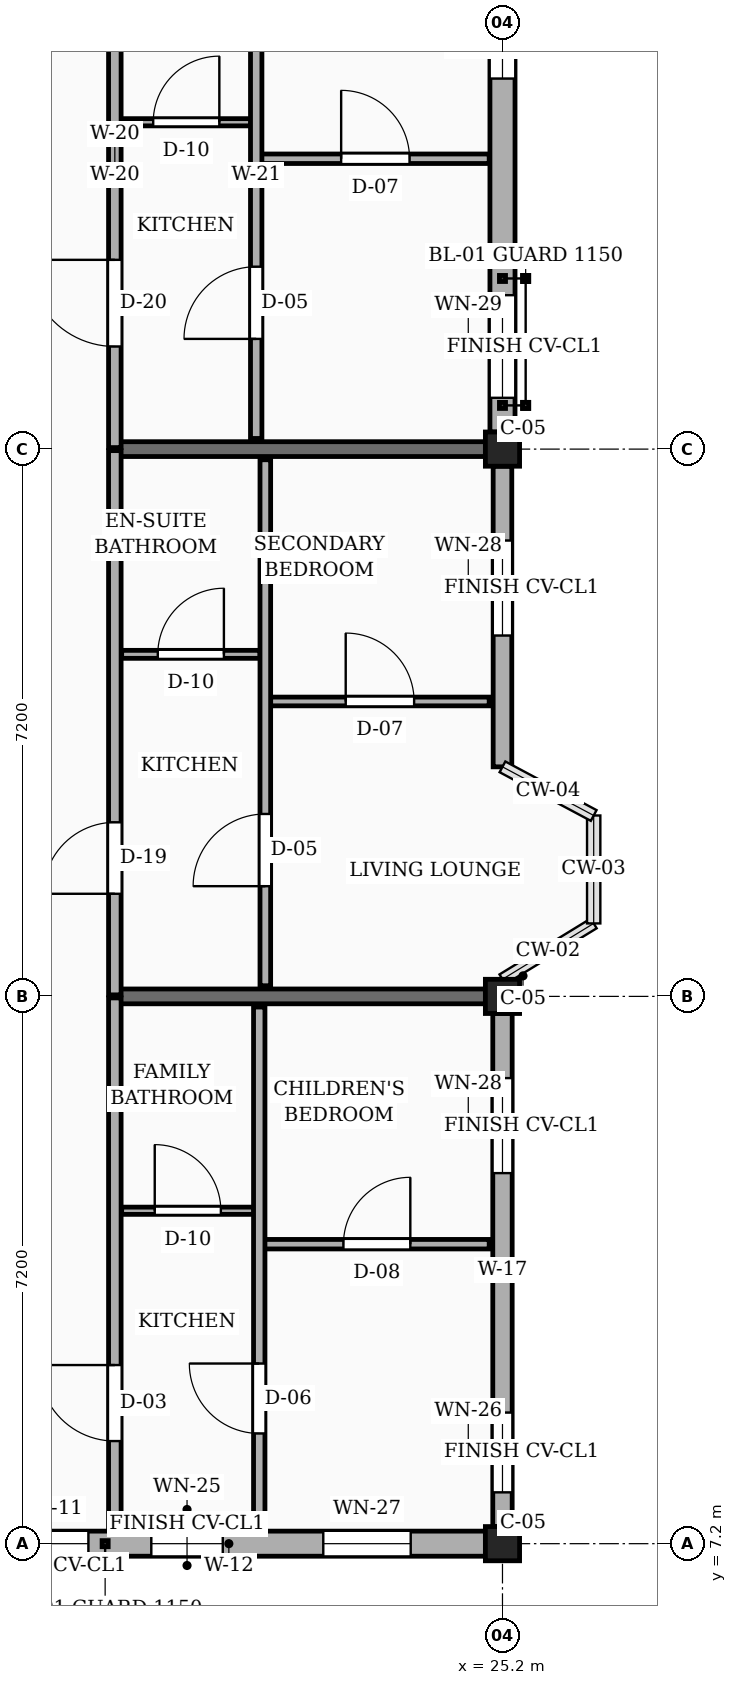
"""IFC4 building model, lengths in metres.
Left out: names, types, materials, properties, quantities, classifications, styles, units other than length and angle.
Written with IfcOpenShell. Run it as: python <this file> out.ifc"""

import sys

from ifc_helpers import new_model, si_unit, direction, frame, frame_2d, origin, origin_2d, place, context, subcontext, project, spatial, rectangle, extrude, element, fill, save


model = new_model("IFC4")
c1 = context("Model", 3, precision=1e-05, world=origin(), true_north=direction((0.0, 1.0)))
c2 = subcontext(c1, "Body", "Model", "MODEL_VIEW")
j1 = project(units=[si_unit("LENGTHUNIT", "METRE"), si_unit("PLANEANGLEUNIT", "RADIAN")], contexts=[c1])
p1 = place(None, origin())
s1 = spatial("IfcSite", under=j1, at=p1, CompositionType="ELEMENT")
p2 = place(p1, origin())
s2 = spatial("IfcBuilding", under=s1, at=p2, CompositionType="ELEMENT")
p3 = place(p2, frame((0.0, 0.0, 39.15)))
s3 = spatial("IfcBuildingStorey", under=s2, at=p3, CompositionType="ELEMENT", Elevation=39.15)
for number, where, z_axis, x_axis in (
    (1, (25.2, 7.2, 0.0), (0.0, 0.0, 1.0), (1.0, 0.0, 0.0)),
    (2, (25.2, 14.4, 0.0), (0.0, 0.0, 1.0), (1.0, 0.0, 0.0)),
    (3, (25.2, 21.6, 0.0), (0.0, 0.0, 1.0), (1.0, 0.0, 0.0)),
):
    element("IfcColumn", number, at=place(p3, frame(where, z_axis=z_axis, x_axis=x_axis)), inside=s3, PredefinedType="COLUMN", context=c2, shape_type="SweptSolid", body=[
        extrude(rectangle(XDim=0.45, YDim=0.45, at=origin_2d()), origin(), (0.0, 0.0, 1.0), 3.15),
    ])
for number, where, z_axis, x_axis in (
    (4, (20.1, 14.4, 0.0), (0.0, 0.0, 1.0), (1.0, 0.0, 0.0)),
    (5, (20.1, 21.6, 0.0), (0.0, 0.0, 1.0), (1.0, 0.0, 0.0)),
):
    element("IfcWall", number, at=place(p3, frame(where, z_axis=z_axis, x_axis=x_axis)), inside=s3, PredefinedType="SOLIDWALL", context=c2, shape_type="SweptSolid", body=[
        extrude(rectangle(XDim=4.875, YDim=0.195, at=frame_2d((2.438, 0.0))), origin(), (0.0, 0.0, 1.0), 2.17),
    ])
p4 = place(p3, frame((18.225, 7.2, 0.0), z_axis=(0.0, 0.0, 1.0), x_axis=(1.0, 0.0, 0.0)))
e6 = element("IfcWall", 6, at=p4, inside=s3, PredefinedType="SOLIDWALL", context=c2, shape_type="SweptSolid", body=[
    extrude(rectangle(XDim=6.75, YDim=0.33, at=frame_2d((3.375, 0.0))), origin(), (0.0, 0.0, 1.0), 2.44),
])
p5 = place(p4, frame((0.488, 0.0, 0.78)))
e7 = element("IfcOpeningElement", 7, at=p5, cuts=e6, PredefinedType="OPENING", context=c2, shape_type="SweptSolid", body=[
    extrude(rectangle(XDim=1.04, YDim=1.26, at=frame_2d((0.52, 0.63))), frame((0.0, 0.175, 0.0), z_axis=(0.0, -1.0, 0.0), x_axis=(1.0, 0.0, 0.0)), (0.0, 0.0, 1.0), 0.35),
])
p6 = place(p4, frame((2.355, 0.0, 0.78)))
e8 = element("IfcOpeningElement", 8, at=p6, cuts=e6, PredefinedType="OPENING", context=c2, shape_type="SweptSolid", body=[
    extrude(rectangle(XDim=0.94, YDim=1.44, at=frame_2d((0.47, 0.72))), frame((0.0, 0.175, 0.0), z_axis=(0.0, -1.0, 0.0), x_axis=(1.0, 0.0, 0.0)), (0.0, 0.0, 1.0), 0.35),
])
p7 = place(p4, frame((4.617, 0.0, 0.78)))
e9 = element("IfcOpeningElement", 9, at=p7, cuts=e6, PredefinedType="OPENING", context=c2, shape_type="SweptSolid", body=[
    extrude(rectangle(XDim=1.15, YDim=1.44, at=frame_2d((0.575, 0.72))), frame((0.0, 0.175, 0.0), z_axis=(0.0, -1.0, 0.0), x_axis=(1.0, 0.0, 0.0)), (0.0, 0.0, 1.0), 0.35),
])
p8 = place(p3, frame((25.2, 7.425, 0.0), z_axis=(0.0, 0.0, 1.0), x_axis=(0.0, 1.0, 0.0)))
e10 = element("IfcWall", 10, at=p8, inside=s3, PredefinedType="SOLIDWALL", context=c2, shape_type="SweptSolid", body=[
    extrude(rectangle(XDim=6.75, YDim=0.255, at=frame_2d((3.375, 0.0))), origin(), (0.0, 0.0, 1.0), 2.44),
])
p9 = place(p8, frame((0.45, 0.0, 0.78)))
e11 = element("IfcOpeningElement", 11, at=p9, cuts=e10, PredefinedType="OPENING", context=c2, shape_type="SweptSolid", body=[
    extrude(rectangle(XDim=1.05, YDim=1.44, at=frame_2d((0.525, 0.72))), frame((0.0, 0.137, 0.0), z_axis=(0.0, -1.0, 0.0), x_axis=(1.0, 0.0, 0.0)), (0.0, 0.0, 1.0), 0.275),
])
p10 = place(p8, frame((4.65, 0.0, 0.78)))
e12 = element("IfcOpeningElement", 12, at=p10, cuts=e10, PredefinedType="OPENING", context=c2, shape_type="SweptSolid", body=[
    extrude(rectangle(XDim=1.25, YDim=1.44, at=frame_2d((0.625, 0.72))), frame((0.0, 0.137, 0.0), z_axis=(0.0, -1.0, 0.0), x_axis=(1.0, 0.0, 0.0)), (0.0, 0.0, 1.0), 0.275),
])
p11 = place(p3, frame((25.2, 17.42, 0.0), z_axis=(0.0, 0.0, 1.0), x_axis=(0.0, 1.0, 0.0)))
e13 = element("IfcWall", 13, at=p11, inside=s3, PredefinedType="SOLIDWALL", context=c2, shape_type="SweptSolid", body=[
    extrude(rectangle(XDim=3.955, YDim=0.245, at=frame_2d((1.978, 0.0))), origin(), (0.0, 0.0, 1.0), 2.44),
])
p12 = place(p11, frame((1.728, 0.0, 0.78)))
e14 = element("IfcOpeningElement", 14, at=p12, cuts=e13, PredefinedType="OPENING", context=c2, shape_type="SweptSolid", body=[
    extrude(rectangle(XDim=1.25, YDim=1.44, at=frame_2d((0.625, 0.72))), frame((0.0, 0.133, 0.0), z_axis=(0.0, -1.0, 0.0), x_axis=(1.0, 0.0, 0.0)), (0.0, 0.0, 1.0), 0.265),
])
p13 = place(p3, frame((25.2, 21.825, 0.0), z_axis=(0.0, 0.0, 1.0), x_axis=(0.0, 1.0, 0.0)))
e15 = element("IfcWall", 15, at=p13, inside=s3, PredefinedType="SOLIDWALL", context=c2, shape_type="SweptSolid", body=[
    extrude(rectangle(XDim=6.75, YDim=0.33, at=frame_2d((3.375, 0.0))), origin(), (0.0, 0.0, 1.0), 2.44),
])
p14 = place(p13, frame((0.45, 0.0, 0.78)))
e16 = element("IfcOpeningElement", 16, at=p14, cuts=e15, PredefinedType="OPENING", context=c2, shape_type="SweptSolid", body=[
    extrude(rectangle(XDim=1.35, YDim=1.44, at=frame_2d((0.675, 0.72))), frame((0.0, 0.175, 0.0), z_axis=(0.0, -1.0, 0.0), x_axis=(1.0, 0.0, 0.0)), (0.0, 0.0, 1.0), 0.35),
])
p15 = place(p13, frame((4.65, 0.0, 0.78)))
e17 = element("IfcOpeningElement", 17, at=p15, cuts=e15, PredefinedType="OPENING", context=c2, shape_type="SweptSolid", body=[
    extrude(rectangle(XDim=0.85, YDim=1.15, at=frame_2d((0.425, 0.575))), frame((0.0, 0.175, 0.0), z_axis=(0.0, -1.0, 0.0), x_axis=(1.0, 0.0, 0.0)), (0.0, 0.0, 1.0), 0.35),
])
p16 = place(p3, frame((20.1, 7.375, 0.0), z_axis=(0.0, 0.0, 1.0), x_axis=(0.0, 1.0, 0.0)))
e18 = element("IfcWall", 18, at=p16, inside=s3, PredefinedType="PARTITIONING", context=c2, shape_type="SweptSolid", body=[
    extrude(rectangle(XDim=7.005, YDim=0.165, at=frame_2d((3.502, 0.0))), origin(), (0.0, 0.0, 1.0), 2.305),
])
p17 = place(p16, frame((1.175, 0.0, 0.0)))
e19 = element("IfcOpeningElement", 19, at=p17, cuts=e18, PredefinedType="OPENING", context=c2, shape_type="SweptSolid", body=[
    extrude(rectangle(XDim=1.0, YDim=2.15, at=frame_2d((0.5, 1.075))), frame((0.0, 0.093, 0.0), z_axis=(0.0, -1.0, 0.0), x_axis=(1.0, 0.0, 0.0)), (0.0, 0.0, 1.0), 0.185),
])
p18 = place(p3, frame((20.1, 14.42, 0.0), z_axis=(0.0, 0.0, 1.0), x_axis=(0.0, 1.0, 0.0)))
e20 = element("IfcWall", 20, at=p18, inside=s3, PredefinedType="PARTITIONING", context=c2, shape_type="SweptSolid", body=[
    extrude(rectangle(XDim=7.16, YDim=0.165, at=frame_2d((3.58, 0.0))), origin(), (0.0, 0.0, 1.0), 2.305),
])
p19 = place(p18, frame((1.33, 0.0, 0.0)))
e21 = element("IfcOpeningElement", 21, at=p19, cuts=e20, PredefinedType="OPENING", context=c2, shape_type="SweptSolid", body=[
    extrude(rectangle(XDim=0.94, YDim=2.12, at=frame_2d((0.47, 1.06))), frame((0.0, 0.093, 0.0), z_axis=(0.0, -1.0, 0.0), x_axis=(1.0, 0.0, 0.0)), (0.0, 0.0, 1.0), 0.185),
])
p20 = place(p3, frame((20.1, 21.62, 0.0), z_axis=(0.0, 0.0, 1.0), x_axis=(0.0, 1.0, 0.0)))
e22 = element("IfcWall", 22, at=p20, inside=s3, PredefinedType="PARTITIONING", context=c2, shape_type="SweptSolid", body=[
    extrude(rectangle(XDim=7.16, YDim=0.165, at=frame_2d((3.58, 0.0))), origin(), (0.0, 0.0, 1.0), 2.305),
])
p21 = place(p20, frame((1.33, 0.0, 0.0)))
e23 = element("IfcOpeningElement", 23, at=p21, cuts=e22, PredefinedType="OPENING", context=c2, shape_type="SweptSolid", body=[
    extrude(rectangle(XDim=1.14, YDim=2.18, at=frame_2d((0.57, 1.09))), frame((0.0, 0.093, 0.0), z_axis=(0.0, -1.0, 0.0), x_axis=(1.0, 0.0, 0.0)), (0.0, 0.0, 1.0), 0.185),
])
p22 = place(p3, frame((22.07, 11.14, 0.0), z_axis=(0.0, 0.0, 1.0), x_axis=(1.0, 0.0, 0.0)))
e24 = element("IfcWall", 24, at=p22, inside=s3, PredefinedType="PARTITIONING", context=c2, shape_type="SweptSolid", body=[
    extrude(rectangle(XDim=2.955, YDim=0.125, at=frame_2d((1.478, 0.0))), origin(), (0.0, 0.0, 1.0), 2.305),
])
p23 = place(p22, frame((1.038, 0.0, 0.0)))
e25 = element("IfcOpeningElement", 25, at=p23, cuts=e24, PredefinedType="OPENING", context=c2, shape_type="SweptSolid", body=[
    extrude(rectangle(XDim=0.88, YDim=2.08, at=frame_2d((0.44, 1.04))), frame((0.0, 0.073, 0.0), z_axis=(0.0, -1.0, 0.0), x_axis=(1.0, 0.0, 0.0)), (0.0, 0.0, 1.0), 0.145),
])
p24 = place(p3, frame((20.19, 11.58, 0.0), z_axis=(0.0, 0.0, 1.0), x_axis=(1.0, 0.0, 0.0)))
e26 = element("IfcWall", 26, at=p24, inside=s3, PredefinedType="PARTITIONING", context=c2, shape_type="SweptSolid", body=[
    extrude(rectangle(XDim=1.74, YDim=0.095, at=frame_2d((0.87, 0.0))), origin(), (0.0, 0.0, 1.0), 2.305),
])
p25 = place(p24, frame((0.435, 0.0, 0.0)))
e27 = element("IfcOpeningElement", 27, at=p25, cuts=e26, PredefinedType="OPENING", context=c2, shape_type="SweptSolid", body=[
    extrude(rectangle(XDim=0.87, YDim=2.05, at=frame_2d((0.435, 1.025))), frame((0.0, 0.058, 0.0), z_axis=(0.0, -1.0, 0.0), x_axis=(1.0, 0.0, 0.0)), (0.0, 0.0, 1.0), 0.115),
])
p26 = place(p3, frame((22.0, 7.375, 0.0), z_axis=(0.0, 0.0, 1.0), x_axis=(0.0, 1.0, 0.0)))
e28 = element("IfcWall", 28, at=p26, inside=s3, PredefinedType="PARTITIONING", context=c2, shape_type="SweptSolid", body=[
    extrude(rectangle(XDim=6.885, YDim=0.15, at=frame_2d((3.442, 0.0))), origin(), (0.0, 0.0, 1.0), 2.305),
])
p27 = place(p26, frame((1.275, 0.0, 0.0)))
e29 = element("IfcOpeningElement", 29, at=p27, cuts=e28, PredefinedType="OPENING", context=c2, shape_type="SweptSolid", body=[
    extrude(rectangle(XDim=0.92, YDim=2.1, at=frame_2d((0.46, 1.05))), frame((0.0, 0.085, 0.0), z_axis=(0.0, -1.0, 0.0), x_axis=(1.0, 0.0, 0.0)), (0.0, 0.0, 1.0), 0.17),
])
p28 = place(p3, frame((22.15, 18.28, 0.0), z_axis=(0.0, 0.0, 1.0), x_axis=(1.0, 0.0, 0.0)))
e30 = element("IfcWall", 30, at=p28, inside=s3, PredefinedType="PARTITIONING", context=c2, shape_type="SweptSolid", body=[
    extrude(rectangle(XDim=2.875, YDim=0.115, at=frame_2d((1.438, 0.0))), origin(), (0.0, 0.0, 1.0), 2.305),
])
p29 = place(p28, frame((0.988, 0.0, 0.0)))
e31 = element("IfcOpeningElement", 31, at=p29, cuts=e30, PredefinedType="OPENING", context=c2, shape_type="SweptSolid", body=[
    extrude(rectangle(XDim=0.9, YDim=2.1, at=frame_2d((0.45, 1.05))), frame((0.0, 0.067, 0.0), z_axis=(0.0, -1.0, 0.0), x_axis=(1.0, 0.0, 0.0)), (0.0, 0.0, 1.0), 0.135),
])
p30 = place(p3, frame((20.19, 18.9, 0.0), z_axis=(0.0, 0.0, 1.0), x_axis=(1.0, 0.0, 0.0)))
e32 = element("IfcWall", 32, at=p30, inside=s3, PredefinedType="PARTITIONING", context=c2, shape_type="SweptSolid", body=[
    extrude(rectangle(XDim=1.82, YDim=0.105, at=frame_2d((0.91, 0.0))), origin(), (0.0, 0.0, 1.0), 2.305),
])
p31 = place(p30, frame((0.475, 0.0, 0.0)))
e33 = element("IfcOpeningElement", 33, at=p31, cuts=e32, PredefinedType="OPENING", context=c2, shape_type="SweptSolid", body=[
    extrude(rectangle(XDim=0.87, YDim=2.05, at=frame_2d((0.435, 1.025))), frame((0.0, 0.062, 0.0), z_axis=(0.0, -1.0, 0.0), x_axis=(1.0, 0.0, 0.0)), (0.0, 0.0, 1.0), 0.125),
])
p32 = place(p3, frame((22.08, 14.54, 0.0), z_axis=(0.0, 0.0, 1.0), x_axis=(0.0, 1.0, 0.0)))
e34 = element("IfcWall", 34, at=p32, inside=s3, PredefinedType="PARTITIONING", context=c2, shape_type="SweptSolid", body=[
    extrude(rectangle(XDim=6.92, YDim=0.14, at=frame_2d((3.46, 0.0))), origin(), (0.0, 0.0, 1.0), 2.305),
])
p33 = place(p32, frame((1.31, 0.0, 0.0)))
e35 = element("IfcOpeningElement", 35, at=p33, cuts=e34, PredefinedType="OPENING", context=c2, shape_type="SweptSolid", body=[
    extrude(rectangle(XDim=0.95, YDim=2.1, at=frame_2d((0.475, 1.05))), frame((0.0, 0.08, 0.0), z_axis=(0.0, -1.0, 0.0), x_axis=(1.0, 0.0, 0.0)), (0.0, 0.0, 1.0), 0.16),
])
p34 = place(p3, frame((22.03, 25.42, 0.0), z_axis=(0.0, 0.0, 1.0), x_axis=(1.0, 0.0, 0.0)))
e36 = element("IfcWall", 36, at=p34, inside=s3, PredefinedType="PARTITIONING", context=c2, shape_type="SweptSolid", body=[
    extrude(rectangle(XDim=2.995, YDim=0.125, at=frame_2d((1.498, 0.0))), origin(), (0.0, 0.0, 1.0), 2.305),
])
p35 = place(p34, frame((1.048, 0.0, 0.0)))
e37 = element("IfcOpeningElement", 37, at=p35, cuts=e36, PredefinedType="OPENING", context=c2, shape_type="SweptSolid", body=[
    extrude(rectangle(XDim=0.9, YDim=2.1, at=frame_2d((0.45, 1.05))), frame((0.0, 0.073, 0.0), z_axis=(0.0, -1.0, 0.0), x_axis=(1.0, 0.0, 0.0)), (0.0, 0.0, 1.0), 0.145),
])
p36 = place(p3, frame((20.19, 25.9, 0.0), z_axis=(0.0, 0.0, 1.0), x_axis=(1.0, 0.0, 0.0)))
e38 = element("IfcWall", 38, at=p36, inside=s3, PredefinedType="PARTITIONING", context=c2, shape_type="SweptSolid", body=[
    extrude(rectangle(XDim=1.7, YDim=0.095, at=frame_2d((0.85, 0.0))), origin(), (0.0, 0.0, 1.0), 2.305),
])
p37 = place(p36, frame((0.415, 0.0, 0.0)))
e39 = element("IfcOpeningElement", 39, at=p37, cuts=e38, PredefinedType="OPENING", context=c2, shape_type="SweptSolid", body=[
    extrude(rectangle(XDim=0.87, YDim=2.05, at=frame_2d((0.435, 1.025))), frame((0.0, 0.058, 0.0), z_axis=(0.0, -1.0, 0.0), x_axis=(1.0, 0.0, 0.0)), (0.0, 0.0, 1.0), 0.115),
])
p38 = place(p3, frame((21.96, 21.74, 0.0), z_axis=(0.0, 0.0, 1.0), x_axis=(0.0, 1.0, 0.0)))
e40 = element("IfcWall", 40, at=p38, inside=s3, PredefinedType="PARTITIONING", context=c2, shape_type="SweptSolid", body=[
    extrude(rectangle(XDim=6.92, YDim=0.15, at=frame_2d((3.46, 0.0))), origin(), (0.0, 0.0, 1.0), 2.305),
])
p39 = place(p38, frame((1.31, 0.0, 0.0)))
e41 = element("IfcOpeningElement", 41, at=p39, cuts=e40, PredefinedType="OPENING", context=c2, shape_type="SweptSolid", body=[
    extrude(rectangle(XDim=0.95, YDim=2.1, at=frame_2d((0.475, 1.05))), frame((0.0, 0.085, 0.0), z_axis=(0.0, -1.0, 0.0), x_axis=(1.0, 0.0, 0.0)), (0.0, 0.0, 1.0), 0.17),
])
p40 = place(p5, origin())
e42 = element("IfcWindow", 42, at=p40, inside=s3, PartitioningType="SINGLE_PANEL", PredefinedType="WINDOW", context=c2, shape_type="SweptSolid", body=[
    extrude(rectangle(XDim=1.04, YDim=1.26, at=frame_2d((0.52, 0.63))), frame((0.0, 0.03, 0.0), z_axis=(0.0, -1.0, 0.0), x_axis=(1.0, 0.0, 0.0)), (0.0, 0.0, 1.0), 0.06),
])
fill(e7, e42)
p41 = place(p6, origin())
e43 = element("IfcWindow", 43, at=p41, inside=s3, PartitioningType="SINGLE_PANEL", PredefinedType="WINDOW", context=c2, shape_type="SweptSolid", body=[
    extrude(rectangle(XDim=0.94, YDim=1.44, at=frame_2d((0.47, 0.72))), frame((0.0, 0.03, 0.0), z_axis=(0.0, -1.0, 0.0), x_axis=(1.0, 0.0, 0.0)), (0.0, 0.0, 1.0), 0.06),
])
fill(e8, e43)
p42 = place(p7, origin())
e44 = element("IfcWindow", 44, at=p42, inside=s3, PartitioningType="SINGLE_PANEL", PredefinedType="WINDOW", context=c2, shape_type="SweptSolid", body=[
    extrude(rectangle(XDim=1.15, YDim=1.44, at=frame_2d((0.575, 0.72))), frame((0.0, 0.03, 0.0), z_axis=(0.0, -1.0, 0.0), x_axis=(1.0, 0.0, 0.0)), (0.0, 0.0, 1.0), 0.06),
])
fill(e9, e44)
p43 = place(p9, origin())
e45 = element("IfcWindow", 45, at=p43, inside=s3, PartitioningType="SINGLE_PANEL", PredefinedType="WINDOW", context=c2, shape_type="SweptSolid", body=[
    extrude(rectangle(XDim=1.05, YDim=1.44, at=frame_2d((0.525, 0.72))), frame((0.0, 0.03, 0.0), z_axis=(0.0, -1.0, 0.0), x_axis=(1.0, 0.0, 0.0)), (0.0, 0.0, 1.0), 0.06),
])
fill(e11, e45)
p44 = place(p10, origin())
e46 = element("IfcWindow", 46, at=p44, inside=s3, PartitioningType="SINGLE_PANEL", PredefinedType="WINDOW", context=c2, shape_type="SweptSolid", body=[
    extrude(rectangle(XDim=1.25, YDim=1.44, at=frame_2d((0.625, 0.72))), frame((0.0, 0.03, 0.0), z_axis=(0.0, -1.0, 0.0), x_axis=(1.0, 0.0, 0.0)), (0.0, 0.0, 1.0), 0.06),
])
fill(e12, e46)
p45 = place(p12, origin())
e47 = element("IfcWindow", 47, at=p45, inside=s3, PartitioningType="SINGLE_PANEL", PredefinedType="WINDOW", context=c2, shape_type="SweptSolid", body=[
    extrude(rectangle(XDim=1.25, YDim=1.44, at=frame_2d((0.625, 0.72))), frame((0.0, 0.03, 0.0), z_axis=(0.0, -1.0, 0.0), x_axis=(1.0, 0.0, 0.0)), (0.0, 0.0, 1.0), 0.06),
])
fill(e14, e47)
p46 = place(p14, origin())
e48 = element("IfcWindow", 48, at=p46, inside=s3, PartitioningType="SINGLE_PANEL", PredefinedType="WINDOW", context=c2, shape_type="SweptSolid", body=[
    extrude(rectangle(XDim=1.35, YDim=1.44, at=frame_2d((0.675, 0.72))), frame((0.0, 0.03, 0.0), z_axis=(0.0, -1.0, 0.0), x_axis=(1.0, 0.0, 0.0)), (0.0, 0.0, 1.0), 0.06),
])
fill(e16, e48)
p47 = place(p15, origin())
e49 = element("IfcWindow", 49, at=p47, inside=s3, PartitioningType="SINGLE_PANEL", PredefinedType="WINDOW", context=c2, shape_type="SweptSolid", body=[
    extrude(rectangle(XDim=0.85, YDim=1.15, at=frame_2d((0.425, 0.575))), frame((0.0, 0.03, 0.0), z_axis=(0.0, -1.0, 0.0), x_axis=(1.0, 0.0, 0.0)), (0.0, 0.0, 1.0), 0.06),
])
fill(e17, e49)
p48 = place(p17, origin())
e50 = element("IfcDoor", 50, at=p48, inside=s3, OperationType="SINGLE_SWING_RIGHT", PredefinedType="DOOR", context=c2, shape_type="SweptSolid", body=[
    extrude(rectangle(XDim=1.0, YDim=2.15, at=frame_2d((0.5, 1.075))), frame((0.0, 0.025, 0.0), z_axis=(0.0, -1.0, 0.0), x_axis=(1.0, 0.0, 0.0)), (0.0, 0.0, 1.0), 0.05),
])
fill(e19, e50)
p49 = place(p19, origin())
e51 = element("IfcDoor", 51, at=p49, inside=s3, OperationType="SINGLE_SWING_LEFT", PredefinedType="DOOR", context=c2, shape_type="SweptSolid", body=[
    extrude(rectangle(XDim=0.94, YDim=2.12, at=frame_2d((0.47, 1.06))), frame((0.0, 0.025, 0.0), z_axis=(0.0, -1.0, 0.0), x_axis=(1.0, 0.0, 0.0)), (0.0, 0.0, 1.0), 0.05),
])
fill(e21, e51)
p50 = place(p21, origin())
e52 = element("IfcDoor", 52, at=p50, inside=s3, OperationType="SINGLE_SWING_RIGHT", PredefinedType="DOOR", context=c2, shape_type="SweptSolid", body=[
    extrude(rectangle(XDim=1.14, YDim=2.18, at=frame_2d((0.57, 1.09))), frame((0.0, 0.025, 0.0), z_axis=(0.0, -1.0, 0.0), x_axis=(1.0, 0.0, 0.0)), (0.0, 0.0, 1.0), 0.05),
])
fill(e23, e52)
p51 = place(p23, origin())
e53 = element("IfcDoor", 53, at=p51, inside=s3, OperationType="SINGLE_SWING_RIGHT", PredefinedType="DOOR", context=c2, shape_type="SweptSolid", body=[
    extrude(rectangle(XDim=0.88, YDim=2.08, at=frame_2d((0.44, 1.04))), frame((0.0, 0.025, 0.0), z_axis=(0.0, -1.0, 0.0), x_axis=(1.0, 0.0, 0.0)), (0.0, 0.0, 1.0), 0.05),
])
fill(e25, e53)
p52 = place(p25, origin())
e54 = element("IfcDoor", 54, at=p52, inside=s3, OperationType="SINGLE_SWING_LEFT", PredefinedType="DOOR", context=c2, shape_type="SweptSolid", body=[
    extrude(rectangle(XDim=0.87, YDim=2.05, at=frame_2d((0.435, 1.025))), frame((0.0, 0.025, 0.0), z_axis=(0.0, -1.0, 0.0), x_axis=(1.0, 0.0, 0.0)), (0.0, 0.0, 1.0), 0.05),
])
fill(e27, e54)
p53 = place(p27, origin())
e55 = element("IfcDoor", 55, at=p53, inside=s3, OperationType="SINGLE_SWING_RIGHT", PredefinedType="DOOR", context=c2, shape_type="SweptSolid", body=[
    extrude(rectangle(XDim=0.92, YDim=2.1, at=frame_2d((0.46, 1.05))), frame((0.0, 0.025, 0.0), z_axis=(0.0, -1.0, 0.0), x_axis=(1.0, 0.0, 0.0)), (0.0, 0.0, 1.0), 0.05),
])
fill(e29, e55)
p54 = place(p29, origin())
e56 = element("IfcDoor", 56, at=p54, inside=s3, OperationType="SINGLE_SWING_LEFT", PredefinedType="DOOR", context=c2, shape_type="SweptSolid", body=[
    extrude(rectangle(XDim=0.9, YDim=2.1, at=frame_2d((0.45, 1.05))), frame((0.0, 0.025, 0.0), z_axis=(0.0, -1.0, 0.0), x_axis=(1.0, 0.0, 0.0)), (0.0, 0.0, 1.0), 0.05),
])
fill(e31, e56)
p55 = place(p31, origin())
e57 = element("IfcDoor", 57, at=p55, inside=s3, OperationType="SINGLE_SWING_RIGHT", PredefinedType="DOOR", context=c2, shape_type="SweptSolid", body=[
    extrude(rectangle(XDim=0.87, YDim=2.05, at=frame_2d((0.435, 1.025))), frame((0.0, 0.025, 0.0), z_axis=(0.0, -1.0, 0.0), x_axis=(1.0, 0.0, 0.0)), (0.0, 0.0, 1.0), 0.05),
])
fill(e33, e57)
p56 = place(p33, origin())
e58 = element("IfcDoor", 58, at=p56, inside=s3, OperationType="SINGLE_SWING_LEFT", PredefinedType="DOOR", context=c2, shape_type="SweptSolid", body=[
    extrude(rectangle(XDim=0.95, YDim=2.1, at=frame_2d((0.475, 1.05))), frame((0.0, 0.025, 0.0), z_axis=(0.0, -1.0, 0.0), x_axis=(1.0, 0.0, 0.0)), (0.0, 0.0, 1.0), 0.05),
])
fill(e35, e58)
p57 = place(p35, origin())
e59 = element("IfcDoor", 59, at=p57, inside=s3, OperationType="SINGLE_SWING_LEFT", PredefinedType="DOOR", context=c2, shape_type="SweptSolid", body=[
    extrude(rectangle(XDim=0.9, YDim=2.1, at=frame_2d((0.45, 1.05))), frame((0.0, 0.025, 0.0), z_axis=(0.0, -1.0, 0.0), x_axis=(1.0, 0.0, 0.0)), (0.0, 0.0, 1.0), 0.05),
])
fill(e37, e59)
p58 = place(p37, origin())
e60 = element("IfcDoor", 60, at=p58, inside=s3, OperationType="SINGLE_SWING_RIGHT", PredefinedType="DOOR", context=c2, shape_type="SweptSolid", body=[
    extrude(rectangle(XDim=0.87, YDim=2.05, at=frame_2d((0.435, 1.025))), frame((0.0, 0.025, 0.0), z_axis=(0.0, -1.0, 0.0), x_axis=(1.0, 0.0, 0.0)), (0.0, 0.0, 1.0), 0.05),
])
fill(e39, e60)
p59 = place(p39, origin())
e61 = element("IfcDoor", 61, at=p59, inside=s3, OperationType="SINGLE_SWING_LEFT", PredefinedType="DOOR", context=c2, shape_type="SweptSolid", body=[
    extrude(rectangle(XDim=0.95, YDim=2.1, at=frame_2d((0.475, 1.05))), frame((0.0, 0.025, 0.0), z_axis=(0.0, -1.0, 0.0), x_axis=(1.0, 0.0, 0.0)), (0.0, 0.0, 1.0), 0.05),
])
fill(e41, e61)
save(model, sys.argv[1])
